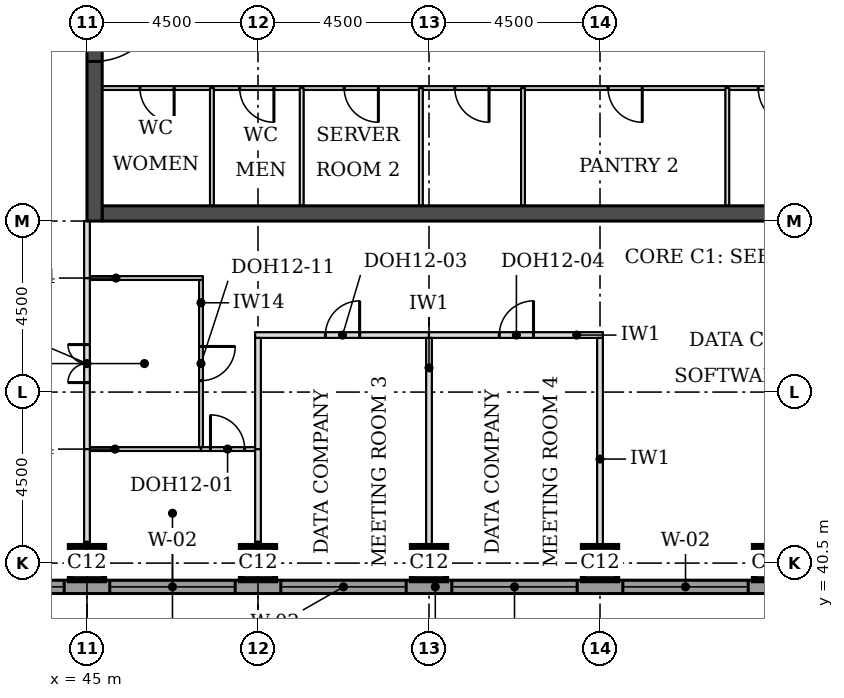
"""IFC4 building model, lengths in metres.
Left out: names, types, materials, properties, quantities, classifications, styles, units other than length and angle.
Written with IfcOpenShell. Run it as: python <this file> out.ifc"""

import sys

from ifc_helpers import new_model, si_unit, direction, frame, frame_2d, origin, origin_2d, place, context, subcontext, project, spatial, rectangle, extrude, element, fill, save


model = new_model("IFC4")
c1 = context("Model", 3, precision=1e-05, world=origin(), true_north=direction((0.0, 1.0)))
c2 = subcontext(c1, "Body", "Model", "MODEL_VIEW")
j1 = project(units=[si_unit("LENGTHUNIT", "METRE"), si_unit("PLANEANGLEUNIT", "RADIAN")], contexts=[c1])
p1 = place(None, origin())
s1 = spatial("IfcSite", under=j1, at=p1, CompositionType="ELEMENT")
p2 = place(p1, origin())
s2 = spatial("IfcBuilding", under=s1, at=p2, CompositionType="ELEMENT")
p3 = place(p2, frame((0.0, 0.0, 252.6)))
s3 = spatial("IfcBuildingStorey", under=s2, at=p3, CompositionType="ELEMENT", Elevation=252.6)
for number, where, z_axis, x_axis in (
    (1, (45.0, 40.5, 0.0), (0.0, 0.0, 1.0), (1.0, 0.0, 0.0)),
    (2, (49.5, 40.5, 0.0), (0.0, 0.0, 1.0), (1.0, 0.0, 0.0)),
    (3, (54.0, 40.5, 0.0), (0.0, 0.0, 1.0), (1.0, 0.0, 0.0)),
    (4, (58.5, 40.5, 0.0), (0.0, 0.0, 1.0), (1.0, 0.0, 0.0)),
    (5, (63.0, 40.5, 0.0), (0.0, 0.0, 1.0), (1.0, 0.0, 0.0)),
):
    element("IfcColumn", number, at=place(p3, frame(where, z_axis=z_axis, x_axis=x_axis)), inside=s3, PredefinedType="COLUMN", context=c2, shape_type="SweptSolid", body=[
        extrude(rectangle(XDim=0.9, YDim=0.9, at=origin_2d()), origin(), (0.0, 0.0, 1.0), 3.7),
    ])
p4 = place(p3, frame((45.4, 49.7, 0.0), z_axis=(0.0, 0.0, 1.0), x_axis=(1.0, 0.0, 0.0)))
e6 = element("IfcWall", 6, at=p4, inside=s3, PredefinedType="SHEAR", context=c2, shape_type="SweptSolid", body=[
    extrude(rectangle(XDim=21.7, YDim=0.4, at=frame_2d((10.85, 0.0))), origin(), (0.0, 0.0, 1.0), 3.7),
])
p5 = place(p3, frame((45.2, 49.5, 0.0), z_axis=(0.0, 0.0, 1.0), x_axis=(0.0, 1.0, 0.0)))
e7 = element("IfcWall", 7, at=p5, inside=s3, PredefinedType="SHEAR", context=c2, shape_type="SweptSolid", body=[
    extrude(rectangle(XDim=22.5, YDim=0.4, at=frame_2d((11.25, 0.0))), origin(), (0.0, 0.0, 1.0), 3.7),
])
p6 = place(p5, frame((4.2, 0.0, 0.0)))
e8 = element("IfcOpeningElement", 8, at=p6, cuts=e7, PredefinedType="OPENING", context=c2, shape_type="SweptSolid", body=[
    extrude(rectangle(XDim=1.8, YDim=2.1, at=frame_2d((0.9, 1.05))), frame((0.0, 0.21, 0.0), z_axis=(0.0, -1.0, 0.0), x_axis=(1.0, 0.0, 0.0)), (0.0, 0.0, 1.0), 0.42),
])
p7 = place(p5, frame((6.9, 0.0, 0.0)))
e9 = element("IfcOpeningElement", 9, at=p7, cuts=e7, PredefinedType="OPENING", context=c2, shape_type="SweptSolid", body=[
    extrude(rectangle(XDim=1.1, YDim=2.1, at=frame_2d((0.55, 1.05))), frame((0.0, 0.21, 0.0), z_axis=(0.0, -1.0, 0.0), x_axis=(1.0, 0.0, 0.0)), (0.0, 0.0, 1.0), 0.42),
])
p8 = place(p5, frame((13.6, 0.0, 0.0)))
e10 = element("IfcOpeningElement", 10, at=p8, cuts=e7, PredefinedType="OPENING", context=c2, shape_type="SweptSolid", body=[
    extrude(rectangle(XDim=1.1, YDim=2.1, at=frame_2d((0.55, 1.05))), frame((0.0, 0.21, 0.0), z_axis=(0.0, -1.0, 0.0), x_axis=(1.0, 0.0, 0.0)), (0.0, 0.0, 1.0), 0.42),
])
p9 = place(p5, frame((16.5, 0.0, 0.0)))
e11 = element("IfcOpeningElement", 11, at=p9, cuts=e7, PredefinedType="OPENING", context=c2, shape_type="SweptSolid", body=[
    extrude(rectangle(XDim=1.8, YDim=2.1, at=frame_2d((0.9, 1.05))), frame((0.0, 0.21, 0.0), z_axis=(0.0, -1.0, 0.0), x_axis=(1.0, 0.0, 0.0)), (0.0, 0.0, 1.0), 0.42),
])
p10 = place(p3, frame((36.0, 39.875, 0.0), z_axis=(0.0, 0.0, 1.0), x_axis=(1.0, 0.0, 0.0)))
e12 = element("IfcWall", 12, at=p10, inside=s3, PredefinedType="STANDARD", context=c2, shape_type="SweptSolid", body=[
    extrude(rectangle(XDim=36.331, YDim=0.35, at=frame_2d((18.166, 0.0))), origin(), (0.0, 0.0, 1.0), 3.525),
])
p11 = place(p10, frame((0.6, 0.0, 0.9)))
e13 = element("IfcOpeningElement", 13, at=p11, cuts=e12, PredefinedType="OPENING", context=c2, shape_type="SweptSolid", body=[
    extrude(rectangle(XDim=3.3, YDim=1.9, at=frame_2d((1.65, 0.95))), frame((0.0, 0.185, 0.0), z_axis=(0.0, -1.0, 0.0), x_axis=(1.0, 0.0, 0.0)), (0.0, 0.0, 1.0), 0.37),
])
p12 = place(p10, frame((5.1, 0.0, 0.9)))
e14 = element("IfcOpeningElement", 14, at=p12, cuts=e12, PredefinedType="OPENING", context=c2, shape_type="SweptSolid", body=[
    extrude(rectangle(XDim=3.3, YDim=1.9, at=frame_2d((1.65, 0.95))), frame((0.0, 0.185, 0.0), z_axis=(0.0, -1.0, 0.0), x_axis=(1.0, 0.0, 0.0)), (0.0, 0.0, 1.0), 0.37),
])
p13 = place(p10, frame((9.6, 0.0, 0.9)))
e15 = element("IfcOpeningElement", 15, at=p13, cuts=e12, PredefinedType="OPENING", context=c2, shape_type="SweptSolid", body=[
    extrude(rectangle(XDim=3.3, YDim=1.9, at=frame_2d((1.65, 0.95))), frame((0.0, 0.185, 0.0), z_axis=(0.0, -1.0, 0.0), x_axis=(1.0, 0.0, 0.0)), (0.0, 0.0, 1.0), 0.37),
])
p14 = place(p10, frame((14.1, 0.0, 0.9)))
e16 = element("IfcOpeningElement", 16, at=p14, cuts=e12, PredefinedType="OPENING", context=c2, shape_type="SweptSolid", body=[
    extrude(rectangle(XDim=3.3, YDim=1.9, at=frame_2d((1.65, 0.95))), frame((0.0, 0.185, 0.0), z_axis=(0.0, -1.0, 0.0), x_axis=(1.0, 0.0, 0.0)), (0.0, 0.0, 1.0), 0.37),
])
p15 = place(p10, frame((18.6, 0.0, 0.9)))
e17 = element("IfcOpeningElement", 17, at=p15, cuts=e12, PredefinedType="OPENING", context=c2, shape_type="SweptSolid", body=[
    extrude(rectangle(XDim=3.3, YDim=1.9, at=frame_2d((1.65, 0.95))), frame((0.0, 0.185, 0.0), z_axis=(0.0, -1.0, 0.0), x_axis=(1.0, 0.0, 0.0)), (0.0, 0.0, 1.0), 0.37),
])
p16 = place(p10, frame((23.1, 0.0, 0.9)))
e18 = element("IfcOpeningElement", 18, at=p16, cuts=e12, PredefinedType="OPENING", context=c2, shape_type="SweptSolid", body=[
    extrude(rectangle(XDim=3.3, YDim=1.9, at=frame_2d((1.65, 0.95))), frame((0.0, 0.185, 0.0), z_axis=(0.0, -1.0, 0.0), x_axis=(1.0, 0.0, 0.0)), (0.0, 0.0, 1.0), 0.37),
])
p17 = place(p10, frame((27.6, 0.0, 0.9)))
e19 = element("IfcOpeningElement", 19, at=p17, cuts=e12, PredefinedType="OPENING", context=c2, shape_type="SweptSolid", body=[
    extrude(rectangle(XDim=3.3, YDim=1.9, at=frame_2d((1.65, 0.95))), frame((0.0, 0.185, 0.0), z_axis=(0.0, -1.0, 0.0), x_axis=(1.0, 0.0, 0.0)), (0.0, 0.0, 1.0), 0.37),
])
p18 = place(p10, frame((32.1, 0.0, 0.9)))
e20 = element("IfcOpeningElement", 20, at=p18, cuts=e12, PredefinedType="OPENING", context=c2, shape_type="SweptSolid", body=[
    extrude(rectangle(XDim=3.3, YDim=1.9, at=frame_2d((1.65, 0.95))), frame((0.0, 0.185, 0.0), z_axis=(0.0, -1.0, 0.0), x_axis=(1.0, 0.0, 0.0)), (0.0, 0.0, 1.0), 0.37),
])
p19 = place(p3, frame((45.075, 43.5, 0.0), z_axis=(0.0, 0.0, 1.0), x_axis=(1.0, 0.0, 0.0)))
e21 = element("IfcWall", 21, at=p19, inside=s3, PredefinedType="PARTITIONING", context=c2, shape_type="SweptSolid", body=[
    extrude(rectangle(XDim=2.925, YDim=0.1, at=frame_2d((1.462, 0.0))), origin(), (0.0, 0.0, 1.0), 3.55),
])
p20 = place(p3, frame((48.0, 43.5, 0.0), z_axis=(0.0, 0.0, 1.0), x_axis=(1.0, 0.0, 0.0)))
e22 = element("IfcWall", 22, at=p20, inside=s3, PredefinedType="PARTITIONING", context=c2, shape_type="SweptSolid", body=[
    extrude(rectangle(XDim=1.425, YDim=0.1, at=frame_2d((0.712, 0.0))), origin(), (0.0, 0.0, 1.0), 3.55),
])
p21 = place(p20, frame((0.25, 0.0, 0.0)))
e23 = element("IfcOpeningElement", 23, at=p21, cuts=e22, PredefinedType="OPENING", context=c2, shape_type="SweptSolid", body=[
    extrude(rectangle(XDim=0.9, YDim=2.1, at=frame_2d((0.45, 1.05))), frame((0.0, 0.06, 0.0), z_axis=(0.0, -1.0, 0.0), x_axis=(1.0, 0.0, 0.0)), (0.0, 0.0, 1.0), 0.12),
])
p22 = place(p3, frame((49.425, 46.5, 0.0), z_axis=(0.0, 0.0, 1.0), x_axis=(1.0, 0.0, 0.0)))
e24 = element("IfcWall", 24, at=p22, inside=s3, PredefinedType="PARTITIONING", context=c2, shape_type="SweptSolid", body=[
    extrude(rectangle(XDim=4.575, YDim=0.15, at=frame_2d((2.288, 0.0))), origin(), (0.0, 0.0, 1.0), 3.55),
])
p23 = place(p22, frame((1.85, 0.0, 0.0)))
e25 = element("IfcOpeningElement", 25, at=p23, cuts=e24, PredefinedType="OPENING", context=c2, shape_type="SweptSolid", body=[
    extrude(rectangle(XDim=0.9, YDim=2.1, at=frame_2d((0.45, 1.05))), frame((0.0, 0.085, 0.0), z_axis=(0.0, -1.0, 0.0), x_axis=(1.0, 0.0, 0.0)), (0.0, 0.0, 1.0), 0.17),
])
p24 = place(p3, frame((54.0, 46.5, 0.0), z_axis=(0.0, 0.0, 1.0), x_axis=(1.0, 0.0, 0.0)))
e26 = element("IfcWall", 26, at=p24, inside=s3, PredefinedType="PARTITIONING", context=c2, shape_type="SweptSolid", body=[
    extrude(rectangle(XDim=4.575, YDim=0.15, at=frame_2d((2.288, 0.0))), origin(), (0.0, 0.0, 1.0), 3.55),
])
p25 = place(p24, frame((1.85, 0.0, 0.0)))
e27 = element("IfcOpeningElement", 27, at=p25, cuts=e26, PredefinedType="OPENING", context=c2, shape_type="SweptSolid", body=[
    extrude(rectangle(XDim=0.9, YDim=2.1, at=frame_2d((0.45, 1.05))), frame((0.0, 0.085, 0.0), z_axis=(0.0, -1.0, 0.0), x_axis=(1.0, 0.0, 0.0)), (0.0, 0.0, 1.0), 0.17),
])
p26 = place(p3, frame((45.075, 48.0, 0.0), z_axis=(0.0, 0.0, 1.0), x_axis=(1.0, 0.0, 0.0)))
e28 = element("IfcWall", 28, at=p26, inside=s3, PredefinedType="PARTITIONING", context=c2, shape_type="SweptSolid", body=[
    extrude(rectangle(XDim=2.975, YDim=0.1, at=frame_2d((1.488, 0.0))), origin(), (0.0, 0.0, 1.0), 3.55),
])
p27 = place(p3, frame((45.0, 40.05, 0.0), z_axis=(0.0, 0.0, 1.0), x_axis=(0.0, 1.0, 0.0)))
e29 = element("IfcWall", 29, at=p27, inside=s3, PredefinedType="PARTITIONING", context=c2, shape_type="SweptSolid", body=[
    extrude(rectangle(XDim=3.45, YDim=0.15, at=frame_2d((1.725, 0.0))), origin(), (0.0, 0.0, 1.0), 3.022),
])
p28 = place(p3, frame((49.5, 40.05, 0.0), z_axis=(0.0, 0.0, 1.0), x_axis=(0.0, 1.0, 0.0)))
e30 = element("IfcWall", 30, at=p28, inside=s3, PredefinedType="PARTITIONING", context=c2, shape_type="SweptSolid", body=[
    extrude(rectangle(XDim=3.45, YDim=0.15, at=frame_2d((1.725, 0.0))), origin(), (0.0, 0.0, 1.0), 3.55),
])
for number, where, z_axis, x_axis in (
    (31, (54.0, 40.05, 0.0), (0.0, 0.0, 1.0), (0.0, 1.0, 0.0)),
    (32, (58.5, 40.05, 0.0), (0.0, 0.0, 1.0), (0.0, 1.0, 0.0)),
):
    element("IfcWall", number, at=place(p3, frame(where, z_axis=z_axis, x_axis=x_axis)), inside=s3, PredefinedType="PARTITIONING", context=c2, shape_type="SweptSolid", body=[
        extrude(rectangle(XDim=6.375, YDim=0.15, at=frame_2d((3.188, 0.0))), origin(), (0.0, 0.0, 1.0), 3.55),
    ])
p29 = place(p3, frame((45.0, 43.5, 0.0), z_axis=(0.0, 0.0, 1.0), x_axis=(0.0, 1.0, 0.0)))
e33 = element("IfcWall", 33, at=p29, inside=s3, PredefinedType="PARTITIONING", context=c2, shape_type="SweptSolid", body=[
    extrude(rectangle(XDim=4.5, YDim=0.15, at=frame_2d((2.25, 0.0))), origin(), (0.0, 0.0, 1.0), 3.022),
])
p30 = place(p29, frame((1.75, 0.0, 0.0)))
e34 = element("IfcOpeningElement", 34, at=p30, cuts=e33, PredefinedType="OPENING", context=c2, shape_type="SweptSolid", body=[
    extrude(rectangle(XDim=1.0, YDim=2.1, at=frame_2d((0.5, 1.05))), frame((0.0, 0.085, 0.0), z_axis=(0.0, -1.0, 0.0), x_axis=(1.0, 0.0, 0.0)), (0.0, 0.0, 1.0), 0.17),
])
p31 = place(p3, frame((49.5, 43.5, 0.0), z_axis=(0.0, 0.0, 1.0), x_axis=(0.0, 1.0, 0.0)))
e35 = element("IfcWall", 35, at=p31, inside=s3, PredefinedType="PARTITIONING", context=c2, shape_type="SweptSolid", body=[
    extrude(rectangle(XDim=2.925, YDim=0.15, at=frame_2d((1.462, 0.0))), origin(), (0.0, 0.0, 1.0), 3.55),
])
p32 = place(p3, frame((48.0, 43.55, 0.0), z_axis=(0.0, 0.0, 1.0), x_axis=(0.0, 1.0, 0.0)))
e36 = element("IfcWall", 36, at=p32, inside=s3, PredefinedType="PARTITIONING", context=c2, shape_type="SweptSolid", body=[
    extrude(rectangle(XDim=4.4, YDim=0.1, at=frame_2d((2.2, 0.0))), origin(), (0.0, 0.0, 1.0), 3.55),
])
p33 = place(p32, frame((1.75, 0.0, 0.0)))
e37 = element("IfcOpeningElement", 37, at=p33, cuts=e36, PredefinedType="OPENING", context=c2, shape_type="SweptSolid", body=[
    extrude(rectangle(XDim=0.9, YDim=2.1, at=frame_2d((0.45, 1.05))), frame((0.0, 0.06, 0.0), z_axis=(0.0, -1.0, 0.0), x_axis=(1.0, 0.0, 0.0)), (0.0, 0.0, 1.0), 0.12),
])
p34 = place(p3, frame((45.0, 48.0, 0.0), z_axis=(0.0, 0.0, 1.0), x_axis=(0.0, 1.0, 0.0)))
e38 = element("IfcWall", 38, at=p34, inside=s3, PredefinedType="PARTITIONING", context=c2, shape_type="SweptSolid", body=[
    extrude(rectangle(XDim=1.5, YDim=0.15, at=frame_2d((0.75, 0.0))), origin(), (0.0, 0.0, 1.0), 3.022),
])
p35 = place(p3, frame((45.4, 53.0, 0.0), z_axis=(0.0, 0.0, 1.0), x_axis=(1.0, 0.0, 0.0)))
e39 = element("IfcWall", 39, at=p35, inside=s3, PredefinedType="PARTITIONING", context=c2, shape_type="SweptSolid", body=[
    extrude(rectangle(XDim=21.7, YDim=0.1, at=frame_2d((10.85, 0.0))), origin(), (0.0, 0.0, 1.0), 3.55),
])
p36 = place(p35, frame((19.938, 0.0, 0.0)))
e40 = element("IfcOpeningElement", 40, at=p36, cuts=e39, PredefinedType="OPENING", context=c2, shape_type="SweptSolid", body=[
    extrude(rectangle(XDim=0.9, YDim=2.1, at=frame_2d((0.45, 1.05))), frame((0.0, 0.06, 0.0), z_axis=(0.0, -1.0, 0.0), x_axis=(1.0, 0.0, 0.0)), (0.0, 0.0, 1.0), 0.12),
])
p37 = place(p35, frame((17.262, 0.0, 0.0)))
e41 = element("IfcOpeningElement", 41, at=p37, cuts=e39, PredefinedType="OPENING", context=c2, shape_type="SweptSolid", body=[
    extrude(rectangle(XDim=1.0, YDim=2.1, at=frame_2d((0.5, 1.05))), frame((0.0, 0.06, 0.0), z_axis=(0.0, -1.0, 0.0), x_axis=(1.0, 0.0, 0.0)), (0.0, 0.0, 1.0), 0.12),
])
p38 = place(p35, frame((0.994, 0.0, 0.0)))
e42 = element("IfcOpeningElement", 42, at=p38, cuts=e39, PredefinedType="OPENING", context=c2, shape_type="SweptSolid", body=[
    extrude(rectangle(XDim=0.9, YDim=2.1, at=frame_2d((0.45, 1.05))), frame((0.0, 0.06, 0.0), z_axis=(0.0, -1.0, 0.0), x_axis=(1.0, 0.0, 0.0)), (0.0, 0.0, 1.0), 0.12),
])
p39 = place(p35, frame((3.619, 0.0, 0.0)))
e43 = element("IfcOpeningElement", 43, at=p39, cuts=e39, PredefinedType="OPENING", context=c2, shape_type="SweptSolid", body=[
    extrude(rectangle(XDim=0.9, YDim=2.1, at=frame_2d((0.45, 1.05))), frame((0.0, 0.06, 0.0), z_axis=(0.0, -1.0, 0.0), x_axis=(1.0, 0.0, 0.0)), (0.0, 0.0, 1.0), 0.12),
])
p40 = place(p35, frame((6.368, 0.0, 0.0)))
e44 = element("IfcOpeningElement", 44, at=p40, cuts=e39, PredefinedType="OPENING", context=c2, shape_type="SweptSolid", body=[
    extrude(rectangle(XDim=0.9, YDim=2.1, at=frame_2d((0.45, 1.05))), frame((0.0, 0.06, 0.0), z_axis=(0.0, -1.0, 0.0), x_axis=(1.0, 0.0, 0.0)), (0.0, 0.0, 1.0), 0.12),
])
p41 = place(p35, frame((9.28, 0.0, 0.0)))
e45 = element("IfcOpeningElement", 45, at=p41, cuts=e39, PredefinedType="OPENING", context=c2, shape_type="SweptSolid", body=[
    extrude(rectangle(XDim=0.9, YDim=2.1, at=frame_2d((0.45, 1.05))), frame((0.0, 0.06, 0.0), z_axis=(0.0, -1.0, 0.0), x_axis=(1.0, 0.0, 0.0)), (0.0, 0.0, 1.0), 0.12),
])
p42 = place(p35, frame((13.312, 0.0, 0.0)))
e46 = element("IfcOpeningElement", 46, at=p42, cuts=e39, PredefinedType="OPENING", context=c2, shape_type="SweptSolid", body=[
    extrude(rectangle(XDim=0.9, YDim=2.1, at=frame_2d((0.45, 1.05))), frame((0.0, 0.06, 0.0), z_axis=(0.0, -1.0, 0.0), x_axis=(1.0, 0.0, 0.0)), (0.0, 0.0, 1.0), 0.12),
])
for number, where, z_axis, x_axis in (
    (47, (48.288, 49.9, 0.0), (0.0, 0.0, 1.0), (0.0, 1.0, 0.0)),
    (48, (50.65, 49.9, 0.0), (0.0, 0.0, 1.0), (0.0, 1.0, 0.0)),
    (49, (53.786, 49.9, 0.0), (0.0, 0.0, 1.0), (0.0, 1.0, 0.0)),
    (50, (56.474, 49.9, 0.0), (0.0, 0.0, 1.0), (0.0, 1.0, 0.0)),
    (51, (61.85, 49.9, 0.0), (0.0, 0.0, 1.0), (0.0, 1.0, 0.0)),
):
    element("IfcWall", number, at=place(p3, frame(where, z_axis=z_axis, x_axis=x_axis)), inside=s3, PredefinedType="PARTITIONING", context=c2, shape_type="SweptSolid", body=[
        extrude(rectangle(XDim=3.1, YDim=0.1, at=frame_2d((1.55, 0.0))), origin(), (0.0, 0.0, 1.0), 3.55),
    ])
p43 = place(p12, origin())
e52 = element("IfcWindow", 52, at=p43, inside=s3, PartitioningType="SINGLE_PANEL", PredefinedType="WINDOW", context=c2, shape_type="SweptSolid", body=[
    extrude(rectangle(XDim=3.3, YDim=1.9, at=frame_2d((1.65, 0.95))), frame((0.0, 0.085, 0.0), z_axis=(0.0, -1.0, 0.0), x_axis=(1.0, 0.0, 0.0)), (0.0, 0.0, 1.0), 0.06),
])
fill(e14, e52)
p44 = place(p13, origin())
e53 = element("IfcWindow", 53, at=p44, inside=s3, PartitioningType="SINGLE_PANEL", PredefinedType="WINDOW", context=c2, shape_type="SweptSolid", body=[
    extrude(rectangle(XDim=3.3, YDim=1.9, at=frame_2d((1.65, 0.95))), frame((0.0, 0.085, 0.0), z_axis=(0.0, -1.0, 0.0), x_axis=(1.0, 0.0, 0.0)), (0.0, 0.0, 1.0), 0.06),
])
fill(e15, e53)
p45 = place(p14, origin())
e54 = element("IfcWindow", 54, at=p45, inside=s3, PartitioningType="SINGLE_PANEL", PredefinedType="WINDOW", context=c2, shape_type="SweptSolid", body=[
    extrude(rectangle(XDim=3.3, YDim=1.9, at=frame_2d((1.65, 0.95))), frame((0.0, 0.085, 0.0), z_axis=(0.0, -1.0, 0.0), x_axis=(1.0, 0.0, 0.0)), (0.0, 0.0, 1.0), 0.06),
])
fill(e16, e54)
p46 = place(p15, origin())
e55 = element("IfcWindow", 55, at=p46, inside=s3, PartitioningType="SINGLE_PANEL", PredefinedType="WINDOW", context=c2, shape_type="SweptSolid", body=[
    extrude(rectangle(XDim=3.3, YDim=1.9, at=frame_2d((1.65, 0.95))), frame((0.0, 0.085, 0.0), z_axis=(0.0, -1.0, 0.0), x_axis=(1.0, 0.0, 0.0)), (0.0, 0.0, 1.0), 0.06),
])
fill(e17, e55)
p47 = place(p16, origin())
e56 = element("IfcWindow", 56, at=p47, inside=s3, PartitioningType="SINGLE_PANEL", PredefinedType="WINDOW", context=c2, shape_type="SweptSolid", body=[
    extrude(rectangle(XDim=3.3, YDim=1.9, at=frame_2d((1.65, 0.95))), frame((0.0, 0.085, 0.0), z_axis=(0.0, -1.0, 0.0), x_axis=(1.0, 0.0, 0.0)), (0.0, 0.0, 1.0), 0.06),
])
fill(e18, e56)
p48 = place(p30, origin())
e57 = element("IfcDoor", 57, at=p48, inside=s3, OperationType="DOUBLE_DOOR_SINGLE_SWING", PredefinedType="DOOR", context=c2, shape_type="SweptSolid", body=[
    extrude(rectangle(XDim=1.0, YDim=2.1, at=frame_2d((0.5, 1.05))), frame((0.0, 0.025, 0.0), z_axis=(0.0, -1.0, 0.0), x_axis=(1.0, 0.0, 0.0)), (0.0, 0.0, 1.0), 0.05),
])
fill(e34, e57)
p49 = place(p33, frame((0.9, 0.0, 0.0), z_axis=(0.0, 0.0, 1.0), x_axis=(-1.0, 0.0, 0.0)))
e58 = element("IfcDoor", 58, at=p49, inside=s3, OperationType="SINGLE_SWING_LEFT", PredefinedType="DOOR", context=c2, shape_type="SweptSolid", body=[
    extrude(rectangle(XDim=0.9, YDim=2.1, at=frame_2d((0.45, 1.05))), frame((0.0, 0.025, 0.0), z_axis=(0.0, -1.0, 0.0), x_axis=(1.0, 0.0, 0.0)), (0.0, 0.0, 1.0), 0.05),
])
fill(e37, e58)
p50 = place(p23, origin())
e59 = element("IfcDoor", 59, at=p50, inside=s3, OperationType="SINGLE_SWING_RIGHT", PredefinedType="DOOR", context=c2, shape_type="SweptSolid", body=[
    extrude(rectangle(XDim=0.9, YDim=2.1, at=frame_2d((0.45, 1.05))), frame((0.0, 0.025, 0.0), z_axis=(0.0, -1.0, 0.0), x_axis=(1.0, 0.0, 0.0)), (0.0, 0.0, 1.0), 0.05),
])
fill(e25, e59)
p51 = place(p25, origin())
e60 = element("IfcDoor", 60, at=p51, inside=s3, OperationType="SINGLE_SWING_RIGHT", PredefinedType="DOOR", context=c2, shape_type="SweptSolid", body=[
    extrude(rectangle(XDim=0.9, YDim=2.1, at=frame_2d((0.45, 1.05))), frame((0.0, 0.025, 0.0), z_axis=(0.0, -1.0, 0.0), x_axis=(1.0, 0.0, 0.0)), (0.0, 0.0, 1.0), 0.05),
])
fill(e27, e60)
p52 = place(p21, origin())
e61 = element("IfcDoor", 61, at=p52, inside=s3, OperationType="SINGLE_SWING_LEFT", PredefinedType="DOOR", context=c2, shape_type="SweptSolid", body=[
    extrude(rectangle(XDim=0.9, YDim=2.1, at=frame_2d((0.45, 1.05))), frame((0.0, 0.025, 0.0), z_axis=(0.0, -1.0, 0.0), x_axis=(1.0, 0.0, 0.0)), (0.0, 0.0, 1.0), 0.05),
])
fill(e23, e61)
p53 = place(p6, frame((1.8, 0.0, 0.0), z_axis=(0.0, 0.0, 1.0), x_axis=(-1.0, 0.0, 0.0)))
e62 = element("IfcDoor", 62, at=p53, inside=s3, OperationType="SINGLE_SWING_LEFT", PredefinedType="DOOR", context=c2, shape_type="SweptSolid", body=[
    extrude(rectangle(XDim=1.8, YDim=2.1, at=frame_2d((0.9, 1.05))), frame((0.0, 0.025, 0.0), z_axis=(0.0, -1.0, 0.0), x_axis=(1.0, 0.0, 0.0)), (0.0, 0.0, 1.0), 0.05),
])
fill(e8, e62)
p54 = place(p37, frame((1.0, 0.0, 0.0), z_axis=(0.0, 0.0, 1.0), x_axis=(-1.0, 0.0, 0.0)))
e63 = element("IfcDoor", 63, at=p54, inside=s3, OperationType="SINGLE_SWING_LEFT", PredefinedType="DOOR", context=c2, shape_type="SweptSolid", body=[
    extrude(rectangle(XDim=1.0, YDim=2.1, at=frame_2d((0.5, 1.05))), frame((0.0, 0.025, 0.0), z_axis=(0.0, -1.0, 0.0), x_axis=(1.0, 0.0, 0.0)), (0.0, 0.0, 1.0), 0.05),
])
fill(e41, e63)
p55 = place(p38, frame((0.9, 0.0, 0.0), z_axis=(0.0, 0.0, 1.0), x_axis=(-1.0, 0.0, 0.0)))
e64 = element("IfcDoor", 64, at=p55, inside=s3, OperationType="SINGLE_SWING_LEFT", PredefinedType="DOOR", context=c2, shape_type="SweptSolid", body=[
    extrude(rectangle(XDim=0.9, YDim=2.1, at=frame_2d((0.45, 1.05))), frame((0.0, 0.025, 0.0), z_axis=(0.0, -1.0, 0.0), x_axis=(1.0, 0.0, 0.0)), (0.0, 0.0, 1.0), 0.05),
])
fill(e42, e64)
p56 = place(p39, frame((0.9, 0.0, 0.0), z_axis=(0.0, 0.0, 1.0), x_axis=(-1.0, 0.0, 0.0)))
e65 = element("IfcDoor", 65, at=p56, inside=s3, OperationType="SINGLE_SWING_LEFT", PredefinedType="DOOR", context=c2, shape_type="SweptSolid", body=[
    extrude(rectangle(XDim=0.9, YDim=2.1, at=frame_2d((0.45, 1.05))), frame((0.0, 0.025, 0.0), z_axis=(0.0, -1.0, 0.0), x_axis=(1.0, 0.0, 0.0)), (0.0, 0.0, 1.0), 0.05),
])
fill(e43, e65)
p57 = place(p40, frame((0.9, 0.0, 0.0), z_axis=(0.0, 0.0, 1.0), x_axis=(-1.0, 0.0, 0.0)))
e66 = element("IfcDoor", 66, at=p57, inside=s3, OperationType="SINGLE_SWING_LEFT", PredefinedType="DOOR", context=c2, shape_type="SweptSolid", body=[
    extrude(rectangle(XDim=0.9, YDim=2.1, at=frame_2d((0.45, 1.05))), frame((0.0, 0.025, 0.0), z_axis=(0.0, -1.0, 0.0), x_axis=(1.0, 0.0, 0.0)), (0.0, 0.0, 1.0), 0.05),
])
fill(e44, e66)
p58 = place(p41, frame((0.9, 0.0, 0.0), z_axis=(0.0, 0.0, 1.0), x_axis=(-1.0, 0.0, 0.0)))
e67 = element("IfcDoor", 67, at=p58, inside=s3, OperationType="SINGLE_SWING_LEFT", PredefinedType="DOOR", context=c2, shape_type="SweptSolid", body=[
    extrude(rectangle(XDim=0.9, YDim=2.1, at=frame_2d((0.45, 1.05))), frame((0.0, 0.025, 0.0), z_axis=(0.0, -1.0, 0.0), x_axis=(1.0, 0.0, 0.0)), (0.0, 0.0, 1.0), 0.05),
])
fill(e45, e67)
p59 = place(p42, frame((0.9, 0.0, 0.0), z_axis=(0.0, 0.0, 1.0), x_axis=(-1.0, 0.0, 0.0)))
e68 = element("IfcDoor", 68, at=p59, inside=s3, OperationType="SINGLE_SWING_LEFT", PredefinedType="DOOR", context=c2, shape_type="SweptSolid", body=[
    extrude(rectangle(XDim=0.9, YDim=2.1, at=frame_2d((0.45, 1.05))), frame((0.0, 0.025, 0.0), z_axis=(0.0, -1.0, 0.0), x_axis=(1.0, 0.0, 0.0)), (0.0, 0.0, 1.0), 0.05),
])
fill(e46, e68)
save(model, sys.argv[1])
